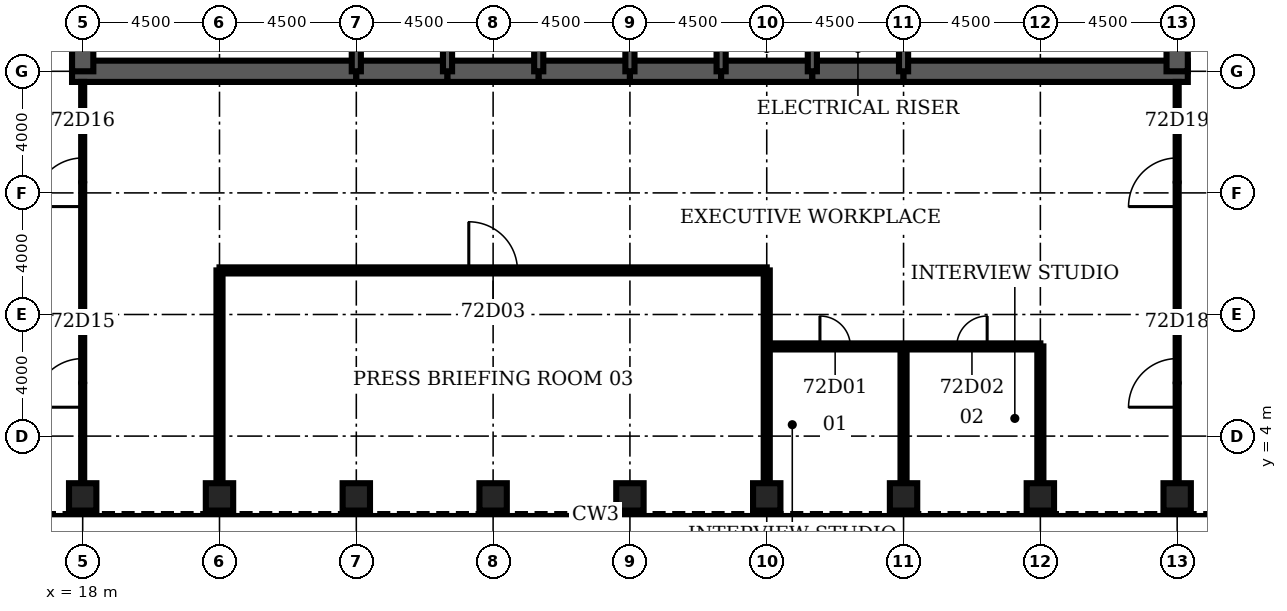
"""IFC4 building model, lengths in metres.
Left out: names, types, materials, properties, quantities, classifications, styles, units other than length and angle.
Written with IfcOpenShell. Run it as: python <this file> out.ifc"""

import sys

from ifc_helpers import new_model, si_unit, direction, frame, frame_2d, origin, origin_2d, place, context, subcontext, project, spatial, rectangle, hollow_rectangle, extrude, element, fill, save


model = new_model("IFC4")
c1 = context("Model", 3, precision=1e-05, world=origin(), true_north=direction((0.0, 1.0)))
c2 = subcontext(c1, "Body", "Model", "MODEL_VIEW")
j1 = project(units=[si_unit("LENGTHUNIT", "METRE"), si_unit("PLANEANGLEUNIT", "RADIAN")], contexts=[c1])
p1 = place(None, origin())
s1 = spatial("IfcSite", under=j1, at=p1, CompositionType="ELEMENT")
p2 = place(p1, origin())
s2 = spatial("IfcBuilding", under=s1, at=p2, CompositionType="ELEMENT")
p3 = place(p2, frame((0.0, 0.0, 317.3)))
s3 = spatial("IfcBuildingStorey", under=s2, at=p3, CompositionType="ELEMENT", Elevation=317.3)
for number, where, z_axis, x_axis in (
    (1, (18.0, 2.0, 0.0), (0.0, 0.0, 1.0), (0.0, 1.0, 0.0)),
    (2, (22.5, 2.0, 0.0), (0.0, 0.0, 1.0), (0.0, 1.0, 0.0)),
    (3, (27.0, 2.0, 0.0), (0.0, 0.0, 1.0), (0.0, 1.0, 0.0)),
    (4, (31.5, 2.0, 0.0), (0.0, 0.0, 1.0), (0.0, 1.0, 0.0)),
    (5, (36.0, 2.0, 0.0), (0.0, 0.0, 1.0), (0.0, 1.0, 0.0)),
    (6, (40.5, 2.0, 0.0), (0.0, 0.0, 1.0), (0.0, 1.0, 0.0)),
    (7, (45.0, 2.0, 0.0), (0.0, 0.0, 1.0), (0.0, 1.0, 0.0)),
    (8, (49.5, 2.0, 0.0), (0.0, 0.0, 1.0), (0.0, 1.0, 0.0)),
    (9, (54.0, 2.0, 0.0), (0.0, 0.0, 1.0), (0.0, 1.0, 0.0)),
):
    element("IfcColumn", number, at=place(p3, frame(where, z_axis=z_axis, x_axis=x_axis)), inside=s3, PredefinedType="COLUMN", context=c2, shape_type="SweptSolid", body=[
        extrude(hollow_rectangle(XDim=0.9, YDim=0.9, WallThickness=0.05, at=origin_2d()), origin(), (0.0, 0.0, 1.0), 4.2),
    ])
p4 = place(p3, frame((17.65, 16.0, 0.0), z_axis=(0.0, 0.0, 1.0), x_axis=(1.0, 0.0, 0.0)))
e10 = element("IfcWall", 10, at=p4, inside=s3, PredefinedType="SHEAR", context=c2, shape_type="SweptSolid", body=[
    extrude(rectangle(XDim=9.35, YDim=0.7, at=frame_2d((4.675, 0.0))), origin(), (0.0, 0.0, 1.0), 4.2),
])
for number, where, z_axis, x_axis in (
    (11, (27.0, 16.0, 0.0), (0.0, 0.0, 1.0), (1.0, 0.0, 0.0)),
    (12, (30.0, 16.0, 0.0), (0.0, 0.0, 1.0), (1.0, 0.0, 0.0)),
    (13, (33.0, 16.0, 0.0), (0.0, 0.0, 1.0), (1.0, 0.0, 0.0)),
    (14, (36.0, 16.0, 0.0), (0.0, 0.0, 1.0), (1.0, 0.0, 0.0)),
    (15, (39.0, 16.0, 0.0), (0.0, 0.0, 1.0), (1.0, 0.0, 0.0)),
    (16, (42.0, 16.0, 0.0), (0.0, 0.0, 1.0), (1.0, 0.0, 0.0)),
):
    element("IfcWall", number, at=place(p3, frame(where, z_axis=z_axis, x_axis=x_axis)), inside=s3, PredefinedType="SHEAR", context=c2, shape_type="SweptSolid", body=[
        extrude(rectangle(XDim=3.0, YDim=0.7, at=frame_2d((1.5, 0.0))), origin(), (0.0, 0.0, 1.0), 4.2),
    ])
p5 = place(p3, frame((45.0, 16.0, 0.0), z_axis=(0.0, 0.0, 1.0), x_axis=(1.0, 0.0, 0.0)))
e17 = element("IfcWall", 17, at=p5, inside=s3, PredefinedType="SHEAR", context=c2, shape_type="SweptSolid", body=[
    extrude(rectangle(XDim=9.35, YDim=0.7, at=frame_2d((4.675, 0.0))), origin(), (0.0, 0.0, 1.0), 4.2),
])
for number, where, z_axis, x_axis in (
    (18, (18.0, 19.2, 0.0), (0.0, 0.0, 1.0), (0.0, -1.0, 0.0)),
    (19, (54.0, 16.0, 0.0), (0.0, 0.0, 1.0), (0.0, 1.0, 0.0)),
):
    element("IfcWall", number, at=place(p3, frame(where, z_axis=z_axis, x_axis=x_axis)), inside=s3, PredefinedType="SHEAR", context=c2, shape_type="SweptSolid", body=[
        extrude(rectangle(XDim=3.2, YDim=0.7, at=frame_2d((1.6, 0.0))), origin(), (0.0, 0.0, 1.0), 4.2),
    ])
for number, where, z_axis, x_axis in (
    (20, (27.0, 16.0, 0.0), (0.0, 0.0, 1.0), (0.0, 1.0, 0.0)),
    (21, (30.0, 16.0, 0.0), (0.0, 0.0, 1.0), (0.0, 1.0, 0.0)),
    (22, (33.0, 16.0, 0.0), (0.0, 0.0, 1.0), (0.0, 1.0, 0.0)),
    (23, (36.0, 16.0, 0.0), (0.0, 0.0, 1.0), (0.0, 1.0, 0.0)),
    (24, (39.0, 16.0, 0.0), (0.0, 0.0, 1.0), (0.0, 1.0, 0.0)),
    (25, (42.0, 16.0, 0.0), (0.0, 0.0, 1.0), (0.0, 1.0, 0.0)),
    (26, (45.0, 16.0, 0.0), (0.0, 0.0, 1.0), (0.0, 1.0, 0.0)),
):
    element("IfcWall", number, at=place(p3, frame(where, z_axis=z_axis, x_axis=x_axis)), inside=s3, PredefinedType="SOLIDWALL", context=c2, shape_type="SweptSolid", body=[
        extrude(rectangle(XDim=3.2, YDim=0.3, at=frame_2d((1.6, 0.0))), origin(), (0.0, 0.0, 1.0), 4.2),
    ])
p6 = place(p3, frame((40.5, 6.95, 0.0), z_axis=(0.0, 0.0, 1.0), x_axis=(1.0, 0.0, 0.0)))
e27 = element("IfcWall", 27, at=p6, inside=s3, PredefinedType="PARTITIONING", context=c2, shape_type="SweptSolid", body=[
    extrude(rectangle(XDim=9.0, YDim=0.2, at=frame_2d((4.5, 0.0))), origin(), (0.0, 0.0, 1.0), 3.0),
])
p7 = place(p6, frame((1.75, 0.0, 0.0)))
e28 = element("IfcOpeningElement", 28, at=p7, cuts=e27, PredefinedType="OPENING", context=c2, shape_type="SweptSolid", body=[
    extrude(rectangle(XDim=1.0, YDim=2.1, at=frame_2d((0.5, 1.05))), frame((0.0, 0.11, 0.0), z_axis=(0.0, -1.0, 0.0), x_axis=(1.0, 0.0, 0.0)), (0.0, 0.0, 1.0), 0.22),
])
p8 = place(p6, frame((6.25, 0.0, 0.0)))
e29 = element("IfcOpeningElement", 29, at=p8, cuts=e27, PredefinedType="OPENING", context=c2, shape_type="SweptSolid", body=[
    extrude(rectangle(XDim=1.0, YDim=2.1, at=frame_2d((0.5, 1.05))), frame((0.0, 0.11, 0.0), z_axis=(0.0, -1.0, 0.0), x_axis=(1.0, 0.0, 0.0)), (0.0, 0.0, 1.0), 0.22),
])
p9 = place(p3, frame((22.5, 9.45, 0.0), z_axis=(0.0, 0.0, 1.0), x_axis=(1.0, 0.0, 0.0)))
e30 = element("IfcWall", 30, at=p9, inside=s3, PredefinedType="PARTITIONING", context=c2, shape_type="SweptSolid", body=[
    extrude(rectangle(XDim=18.0, YDim=0.2, at=frame_2d((9.0, 0.0))), origin(), (0.0, 0.0, 1.0), 3.0),
])
p10 = place(p9, frame((8.2, 0.0, 0.0)))
e31 = element("IfcOpeningElement", 31, at=p10, cuts=e30, PredefinedType="OPENING", context=c2, shape_type="SweptSolid", body=[
    extrude(rectangle(XDim=1.6, YDim=2.1, at=frame_2d((0.8, 1.05))), frame((0.0, 0.11, 0.0), z_axis=(0.0, -1.0, 0.0), x_axis=(1.0, 0.0, 0.0)), (0.0, 0.0, 1.0), 0.22),
])
p11 = place(p3, frame((18.0, 2.45, 0.0), z_axis=(0.0, 0.0, 1.0), x_axis=(0.0, 1.0, 0.0)))
e32 = element("IfcWall", 32, at=p11, inside=s3, PredefinedType="PARTITIONING", context=c2, shape_type="SweptSolid", body=[
    extrude(rectangle(XDim=13.2, YDim=0.1, at=frame_2d((6.6, 0.0))), origin(), (0.0, 0.0, 1.0), 3.0),
])
p12 = place(p11, frame((2.5, 0.0, 0.0)))
e33 = element("IfcOpeningElement", 33, at=p12, cuts=e32, PredefinedType="OPENING", context=c2, shape_type="SweptSolid", body=[
    extrude(rectangle(XDim=1.6, YDim=2.1, at=frame_2d((0.8, 1.05))), frame((0.0, 0.06, 0.0), z_axis=(0.0, -1.0, 0.0), x_axis=(1.0, 0.0, 0.0)), (0.0, 0.0, 1.0), 0.12),
])
p13 = place(p11, frame((9.1, 0.0, 0.0)))
e34 = element("IfcOpeningElement", 34, at=p13, cuts=e32, PredefinedType="OPENING", context=c2, shape_type="SweptSolid", body=[
    extrude(rectangle(XDim=1.6, YDim=2.1, at=frame_2d((0.8, 1.05))), frame((0.0, 0.06, 0.0), z_axis=(0.0, -1.0, 0.0), x_axis=(1.0, 0.0, 0.0)), (0.0, 0.0, 1.0), 0.12),
])
for number, where, z_axis, x_axis in (
    (35, (22.5, 2.45, 0.0), (0.0, 0.0, 1.0), (0.0, 1.0, 0.0)),
    (36, (40.5, 2.45, 0.0), (0.0, 0.0, 1.0), (0.0, 1.0, 0.0)),
):
    element("IfcWall", number, at=place(p3, frame(where, z_axis=z_axis, x_axis=x_axis)), inside=s3, PredefinedType="PARTITIONING", context=c2, shape_type="SweptSolid", body=[
        extrude(rectangle(XDim=7.0, YDim=0.2, at=frame_2d((3.5, 0.0))), origin(), (0.0, 0.0, 1.0), 3.0),
    ])
for number, where, z_axis, x_axis in (
    (37, (45.0, 2.45, 0.0), (0.0, 0.0, 1.0), (0.0, 1.0, 0.0)),
    (38, (49.5, 2.45, 0.0), (0.0, 0.0, 1.0), (0.0, 1.0, 0.0)),
):
    element("IfcWall", number, at=place(p3, frame(where, z_axis=z_axis, x_axis=x_axis)), inside=s3, PredefinedType="PARTITIONING", context=c2, shape_type="SweptSolid", body=[
        extrude(rectangle(XDim=4.5, YDim=0.2, at=frame_2d((2.25, 0.0))), origin(), (0.0, 0.0, 1.0), 3.0),
    ])
p14 = place(p3, frame((54.0, 2.45, 0.0), z_axis=(0.0, 0.0, 1.0), x_axis=(0.0, 1.0, 0.0)))
e39 = element("IfcWall", 39, at=p14, inside=s3, PredefinedType="PARTITIONING", context=c2, shape_type="SweptSolid", body=[
    extrude(rectangle(XDim=13.2, YDim=0.1, at=frame_2d((6.6, 0.0))), origin(), (0.0, 0.0, 1.0), 3.0),
])
p15 = place(p14, frame((2.5, 0.0, 0.0)))
e40 = element("IfcOpeningElement", 40, at=p15, cuts=e39, PredefinedType="OPENING", context=c2, shape_type="SweptSolid", body=[
    extrude(rectangle(XDim=1.6, YDim=2.1, at=frame_2d((0.8, 1.05))), frame((0.0, 0.06, 0.0), z_axis=(0.0, -1.0, 0.0), x_axis=(1.0, 0.0, 0.0)), (0.0, 0.0, 1.0), 0.12),
])
p16 = place(p14, frame((9.1, 0.0, 0.0)))
e41 = element("IfcOpeningElement", 41, at=p16, cuts=e39, PredefinedType="OPENING", context=c2, shape_type="SweptSolid", body=[
    extrude(rectangle(XDim=1.6, YDim=2.1, at=frame_2d((0.8, 1.05))), frame((0.0, 0.06, 0.0), z_axis=(0.0, -1.0, 0.0), x_axis=(1.0, 0.0, 0.0)), (0.0, 0.0, 1.0), 0.12),
])
p17 = place(p7, origin())
e42 = element("IfcDoor", 42, at=p17, inside=s3, OperationType="SINGLE_SWING_LEFT", PredefinedType="DOOR", context=c2, shape_type="SweptSolid", body=[
    extrude(rectangle(XDim=1.0, YDim=2.1, at=frame_2d((0.5, 1.05))), frame((0.0, 0.025, 0.0), z_axis=(0.0, -1.0, 0.0), x_axis=(1.0, 0.0, 0.0)), (0.0, 0.0, 1.0), 0.05),
])
fill(e28, e42)
p18 = place(p8, origin())
e43 = element("IfcDoor", 43, at=p18, inside=s3, OperationType="SINGLE_SWING_RIGHT", PredefinedType="DOOR", context=c2, shape_type="SweptSolid", body=[
    extrude(rectangle(XDim=1.0, YDim=2.1, at=frame_2d((0.5, 1.05))), frame((0.0, 0.025, 0.0), z_axis=(0.0, -1.0, 0.0), x_axis=(1.0, 0.0, 0.0)), (0.0, 0.0, 1.0), 0.05),
])
fill(e29, e43)
p19 = place(p10, origin())
e44 = element("IfcDoor", 44, at=p19, inside=s3, OperationType="SINGLE_SWING_LEFT", PredefinedType="DOOR", context=c2, shape_type="SweptSolid", body=[
    extrude(rectangle(XDim=1.6, YDim=2.1, at=frame_2d((0.8, 1.05))), frame((0.0, 0.025, 0.0), z_axis=(0.0, -1.0, 0.0), x_axis=(1.0, 0.0, 0.0)), (0.0, 0.0, 1.0), 0.05),
])
fill(e31, e44)
p20 = place(p12, origin())
e45 = element("IfcDoor", 45, at=p20, inside=s3, OperationType="SINGLE_SWING_LEFT", PredefinedType="DOOR", context=c2, shape_type="SweptSolid", body=[
    extrude(rectangle(XDim=1.6, YDim=2.1, at=frame_2d((0.8, 1.05))), frame((0.0, 0.025, 0.0), z_axis=(0.0, -1.0, 0.0), x_axis=(1.0, 0.0, 0.0)), (0.0, 0.0, 1.0), 0.05),
])
fill(e33, e45)
p21 = place(p13, origin())
e46 = element("IfcDoor", 46, at=p21, inside=s3, OperationType="SINGLE_SWING_LEFT", PredefinedType="DOOR", context=c2, shape_type="SweptSolid", body=[
    extrude(rectangle(XDim=1.6, YDim=2.1, at=frame_2d((0.8, 1.05))), frame((0.0, 0.025, 0.0), z_axis=(0.0, -1.0, 0.0), x_axis=(1.0, 0.0, 0.0)), (0.0, 0.0, 1.0), 0.05),
])
fill(e34, e46)
p22 = place(p15, origin())
e47 = element("IfcDoor", 47, at=p22, inside=s3, OperationType="SINGLE_SWING_LEFT", PredefinedType="DOOR", context=c2, shape_type="SweptSolid", body=[
    extrude(rectangle(XDim=1.6, YDim=2.1, at=frame_2d((0.8, 1.05))), frame((0.0, 0.025, 0.0), z_axis=(0.0, -1.0, 0.0), x_axis=(1.0, 0.0, 0.0)), (0.0, 0.0, 1.0), 0.05),
])
fill(e40, e47)
p23 = place(p16, origin())
e48 = element("IfcDoor", 48, at=p23, inside=s3, OperationType="SINGLE_SWING_LEFT", PredefinedType="DOOR", context=c2, shape_type="SweptSolid", body=[
    extrude(rectangle(XDim=1.6, YDim=2.1, at=frame_2d((0.8, 1.05))), frame((0.0, 0.025, 0.0), z_axis=(0.0, -1.0, 0.0), x_axis=(1.0, 0.0, 0.0)), (0.0, 0.0, 1.0), 0.05),
])
fill(e41, e48)
save(model, sys.argv[1])
